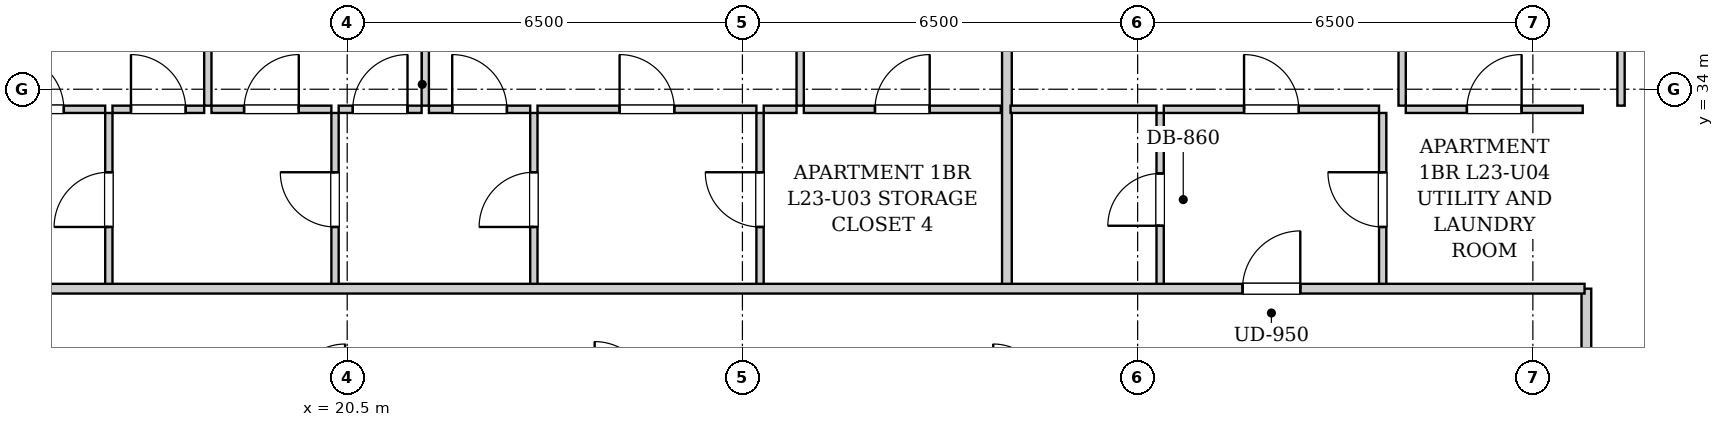
"""IFC4 building model, lengths in metres.
Left out: names, types, materials, properties, quantities, classifications, styles, units other than length and angle.
Written with IfcOpenShell. Run it as: python <this file> out.ifc"""

import sys

from ifc_helpers import new_model, si_unit, direction, frame, frame_2d, origin, place, context, subcontext, project, spatial, rectangle, extrude, element, fill, save


model = new_model("IFC4")
c1 = context("Model", 3, precision=1e-05, world=origin(), true_north=direction((0.0, 1.0)))
c2 = subcontext(c1, "Body", "Model", "MODEL_VIEW")
j1 = project(units=[si_unit("LENGTHUNIT", "METRE"), si_unit("PLANEANGLEUNIT", "RADIAN")], contexts=[c1])
p1 = place(None, origin())
s1 = spatial("IfcSite", under=j1, at=p1, CompositionType="ELEMENT")
p2 = place(p1, origin())
s2 = spatial("IfcBuilding", under=s1, at=p2, CompositionType="ELEMENT")
p3 = place(p2, frame((0.0, 0.0, 84.7)))
s3 = spatial("IfcBuildingStorey", under=s2, at=p3, CompositionType="ELEMENT", Elevation=84.7)
p4 = place(p3, frame((40.88, 28.98, 0.0), z_axis=(0.0, 0.0, 1.0), x_axis=(0.0, 1.0, 0.0)))
e1 = element("IfcWall", 1, at=p4, inside=s3, PredefinedType="PARTITIONING", context=c2, shape_type="SweptSolid", body=[
    extrude(rectangle(XDim=1.74, YDim=0.16, at=frame_2d((0.87, 0.0))), origin(), (0.0, 0.0, 1.0), 2.94),
])
p5 = place(p3, frame((16.58, 30.76, 0.0), z_axis=(0.0, 0.0, 1.0), x_axis=(0.0, 1.0, 0.0)))
e2 = element("IfcWall", 2, at=p5, inside=s3, PredefinedType="PARTITIONING", context=c2, shape_type="SweptSolid", body=[
    extrude(rectangle(XDim=2.85, YDim=0.12, at=frame_2d((1.425, 0.0))), origin(), (0.0, 0.0, 1.0), 2.94),
])
p6 = place(p5, frame((0.975, 0.0, 0.0)))
e3 = element("IfcOpeningElement", 3, at=p6, cuts=e2, PredefinedType="OPENING", context=c2, shape_type="SweptSolid", body=[
    extrude(rectangle(XDim=0.9, YDim=2.05, at=frame_2d((0.45, 1.025))), frame((0.0, 0.07, 0.0), z_axis=(0.0, -1.0, 0.0), x_axis=(1.0, 0.0, 0.0)), (0.0, 0.0, 1.0), 0.14),
])
p7 = place(p3, frame((14.26, 33.67, 0.0), z_axis=(0.0, 0.0, 1.0), x_axis=(1.0, 0.0, 0.0)))
e4 = element("IfcWall", 4, at=p7, inside=s3, PredefinedType="PARTITIONING", context=c2, shape_type="SweptSolid", body=[
    extrude(rectangle(XDim=2.26, YDim=0.12, at=frame_2d((1.13, 0.0))), origin(), (0.0, 0.0, 1.0), 2.94),
])
p8 = place(p7, frame((0.68, 0.0, 0.0)))
e5 = element("IfcOpeningElement", 5, at=p8, cuts=e4, PredefinedType="OPENING", context=c2, shape_type="SweptSolid", body=[
    extrude(rectangle(XDim=0.9, YDim=2.05, at=frame_2d((0.45, 1.025))), frame((0.0, 0.07, 0.0), z_axis=(0.0, -1.0, 0.0), x_axis=(1.0, 0.0, 0.0)), (0.0, 0.0, 1.0), 0.14),
])
p9 = place(p3, frame((20.3, 30.76, 0.0), z_axis=(0.0, 0.0, 1.0), x_axis=(0.0, 1.0, 0.0)))
e6 = element("IfcWall", 6, at=p9, inside=s3, PredefinedType="PARTITIONING", context=c2, shape_type="SweptSolid", body=[
    extrude(rectangle(XDim=2.85, YDim=0.12, at=frame_2d((1.425, 0.0))), origin(), (0.0, 0.0, 1.0), 2.94),
])
p10 = place(p9, frame((0.975, 0.0, 0.0)))
e7 = element("IfcOpeningElement", 7, at=p10, cuts=e6, PredefinedType="OPENING", context=c2, shape_type="SweptSolid", body=[
    extrude(rectangle(XDim=0.9, YDim=2.05, at=frame_2d((0.45, 1.025))), frame((0.0, 0.07, 0.0), z_axis=(0.0, -1.0, 0.0), x_axis=(1.0, 0.0, 0.0)), (0.0, 0.0, 1.0), 0.14),
])
p11 = place(p3, frame((16.64, 33.67, 0.0), z_axis=(0.0, 0.0, 1.0), x_axis=(1.0, 0.0, 0.0)))
e8 = element("IfcWall", 8, at=p11, inside=s3, PredefinedType="PARTITIONING", context=c2, shape_type="SweptSolid", body=[
    extrude(rectangle(XDim=1.508, YDim=0.12, at=frame_2d((0.754, 0.0))), origin(), (0.0, 0.0, 1.0), 2.94),
])
p12 = place(p11, frame((0.304, 0.0, 0.0)))
e9 = element("IfcOpeningElement", 9, at=p12, cuts=e8, PredefinedType="OPENING", context=c2, shape_type="SweptSolid", body=[
    extrude(rectangle(XDim=0.9, YDim=2.05, at=frame_2d((0.45, 1.025))), frame((0.0, 0.07, 0.0), z_axis=(0.0, -1.0, 0.0), x_axis=(1.0, 0.0, 0.0)), (0.0, 0.0, 1.0), 0.14),
])
p13 = place(p3, frame((18.268, 33.67, 0.0), z_axis=(0.0, 0.0, 1.0), x_axis=(1.0, 0.0, 0.0)))
e10 = element("IfcWall", 10, at=p13, inside=s3, PredefinedType="PARTITIONING", context=c2, shape_type="SweptSolid", body=[
    extrude(rectangle(XDim=1.972, YDim=0.12, at=frame_2d((0.986, 0.0))), origin(), (0.0, 0.0, 1.0), 2.94),
])
p14 = place(p13, frame((0.536, 0.0, 0.0)))
e11 = element("IfcOpeningElement", 11, at=p14, cuts=e10, PredefinedType="OPENING", context=c2, shape_type="SweptSolid", body=[
    extrude(rectangle(XDim=0.9, YDim=2.05, at=frame_2d((0.45, 1.025))), frame((0.0, 0.07, 0.0), z_axis=(0.0, -1.0, 0.0), x_axis=(1.0, 0.0, 0.0)), (0.0, 0.0, 1.0), 0.14),
])
p15 = place(p3, frame((23.57, 30.76, 0.0), z_axis=(0.0, 0.0, 1.0), x_axis=(0.0, 1.0, 0.0)))
e12 = element("IfcWall", 12, at=p15, inside=s3, PredefinedType="PARTITIONING", context=c2, shape_type="SweptSolid", body=[
    extrude(rectangle(XDim=2.85, YDim=0.12, at=frame_2d((1.425, 0.0))), origin(), (0.0, 0.0, 1.0), 2.94),
])
p16 = place(p15, frame((0.975, 0.0, 0.0)))
e13 = element("IfcOpeningElement", 13, at=p16, cuts=e12, PredefinedType="OPENING", context=c2, shape_type="SweptSolid", body=[
    extrude(rectangle(XDim=0.9, YDim=2.05, at=frame_2d((0.45, 1.025))), frame((0.0, 0.07, 0.0), z_axis=(0.0, -1.0, 0.0), x_axis=(1.0, 0.0, 0.0)), (0.0, 0.0, 1.0), 0.14),
])
p17 = place(p3, frame((20.36, 33.67, 0.0), z_axis=(0.0, 0.0, 1.0), x_axis=(1.0, 0.0, 0.0)))
e14 = element("IfcWall", 14, at=p17, inside=s3, PredefinedType="PARTITIONING", context=c2, shape_type="SweptSolid", body=[
    extrude(rectangle(XDim=1.364, YDim=0.12, at=frame_2d((0.682, 0.0))), origin(), (0.0, 0.0, 1.0), 2.94),
])
p18 = place(p17, frame((0.232, 0.0, 0.0)))
e15 = element("IfcOpeningElement", 15, at=p18, cuts=e14, PredefinedType="OPENING", context=c2, shape_type="SweptSolid", body=[
    extrude(rectangle(XDim=0.9, YDim=2.05, at=frame_2d((0.45, 1.025))), frame((0.0, 0.07, 0.0), z_axis=(0.0, -1.0, 0.0), x_axis=(1.0, 0.0, 0.0)), (0.0, 0.0, 1.0), 0.14),
])
p19 = place(p3, frame((21.844, 33.67, 0.0), z_axis=(0.0, 0.0, 1.0), x_axis=(1.0, 0.0, 0.0)))
e16 = element("IfcWall", 16, at=p19, inside=s3, PredefinedType="PARTITIONING", context=c2, shape_type="SweptSolid", body=[
    extrude(rectangle(XDim=1.666, YDim=0.12, at=frame_2d((0.833, 0.0))), origin(), (0.0, 0.0, 1.0), 2.94),
])
p20 = place(p19, frame((0.383, 0.0, 0.0)))
e17 = element("IfcOpeningElement", 17, at=p20, cuts=e16, PredefinedType="OPENING", context=c2, shape_type="SweptSolid", body=[
    extrude(rectangle(XDim=0.9, YDim=2.05, at=frame_2d((0.45, 1.025))), frame((0.0, 0.07, 0.0), z_axis=(0.0, -1.0, 0.0), x_axis=(1.0, 0.0, 0.0)), (0.0, 0.0, 1.0), 0.14),
])
p21 = place(p3, frame((27.29, 30.76, 0.0), z_axis=(0.0, 0.0, 1.0), x_axis=(0.0, 1.0, 0.0)))
e18 = element("IfcWall", 18, at=p21, inside=s3, PredefinedType="PARTITIONING", context=c2, shape_type="SweptSolid", body=[
    extrude(rectangle(XDim=2.85, YDim=0.12, at=frame_2d((1.425, 0.0))), origin(), (0.0, 0.0, 1.0), 2.94),
])
p22 = place(p21, frame((0.975, 0.0, 0.0)))
e19 = element("IfcOpeningElement", 19, at=p22, cuts=e18, PredefinedType="OPENING", context=c2, shape_type="SweptSolid", body=[
    extrude(rectangle(XDim=0.9, YDim=2.05, at=frame_2d((0.45, 1.025))), frame((0.0, 0.07, 0.0), z_axis=(0.0, -1.0, 0.0), x_axis=(1.0, 0.0, 0.0)), (0.0, 0.0, 1.0), 0.14),
])
p23 = place(p3, frame((23.63, 33.67, 0.0), z_axis=(0.0, 0.0, 1.0), x_axis=(1.0, 0.0, 0.0)))
e20 = element("IfcWall", 20, at=p23, inside=s3, PredefinedType="PARTITIONING", context=c2, shape_type="SweptSolid", body=[
    extrude(rectangle(XDim=3.6, YDim=0.12, at=frame_2d((1.8, 0.0))), origin(), (0.0, 0.0, 1.0), 2.94),
])
p24 = place(p23, frame((1.35, 0.0, 0.0)))
e21 = element("IfcOpeningElement", 21, at=p24, cuts=e20, PredefinedType="OPENING", context=c2, shape_type="SweptSolid", body=[
    extrude(rectangle(XDim=0.9, YDim=2.05, at=frame_2d((0.45, 1.025))), frame((0.0, 0.07, 0.0), z_axis=(0.0, -1.0, 0.0), x_axis=(1.0, 0.0, 0.0)), (0.0, 0.0, 1.0), 0.14),
])
p25 = place(p3, frame((27.35, 33.67, 0.0), z_axis=(0.0, 0.0, 1.0), x_axis=(1.0, 0.0, 0.0)))
e22 = element("IfcWall", 22, at=p25, inside=s3, PredefinedType="PARTITIONING", context=c2, shape_type="SweptSolid", body=[
    extrude(rectangle(XDim=0.54, YDim=0.12, at=frame_2d((0.27, 0.0))), origin(), (0.0, 0.0, 1.0), 2.94),
])
p26 = place(p3, frame((28.01, 33.67, 0.0), z_axis=(0.0, 0.0, 1.0), x_axis=(1.0, 0.0, 0.0)))
e23 = element("IfcWall", 23, at=p26, inside=s3, PredefinedType="PARTITIONING", context=c2, shape_type="SweptSolid", body=[
    extrude(rectangle(XDim=3.24, YDim=0.12, at=frame_2d((1.62, 0.0))), origin(), (0.0, 0.0, 1.0), 2.94),
])
p27 = place(p26, frame((1.17, 0.0, 0.0)))
e24 = element("IfcOpeningElement", 24, at=p27, cuts=e23, PredefinedType="OPENING", context=c2, shape_type="SweptSolid", body=[
    extrude(rectangle(XDim=0.9, YDim=2.05, at=frame_2d((0.45, 1.025))), frame((0.0, 0.07, 0.0), z_axis=(0.0, -1.0, 0.0), x_axis=(1.0, 0.0, 0.0)), (0.0, 0.0, 1.0), 0.14),
])
p28 = place(p3, frame((18.208, 33.73, 0.0), z_axis=(0.0, 0.0, 1.0), x_axis=(0.0, 1.0, 0.0)))
e25 = element("IfcWall", 25, at=p28, inside=s3, PredefinedType="PARTITIONING", context=c2, shape_type="SweptSolid", body=[
    extrude(rectangle(XDim=9.29, YDim=0.12, at=frame_2d((4.645, 0.0))), origin(), (0.0, 0.0, 1.0), 2.94),
])
p29 = place(p28, frame((4.18, 0.0, 0.0)))
e26 = element("IfcOpeningElement", 26, at=p29, cuts=e25, PredefinedType="OPENING", context=c2, shape_type="SweptSolid", body=[
    extrude(rectangle(XDim=0.9, YDim=2.05, at=frame_2d((0.45, 1.025))), frame((0.0, 0.07, 0.0), z_axis=(0.0, -1.0, 0.0), x_axis=(1.0, 0.0, 0.0)), (0.0, 0.0, 1.0), 0.14),
])
p30 = place(p3, frame((21.784, 33.73, 0.0), z_axis=(0.0, 0.0, 1.0), x_axis=(0.0, 1.0, 0.0)))
e27 = element("IfcWall", 27, at=p30, inside=s3, PredefinedType="PARTITIONING", context=c2, shape_type="SweptSolid", body=[
    extrude(rectangle(XDim=9.29, YDim=0.12, at=frame_2d((4.645, 0.0))), origin(), (0.0, 0.0, 1.0), 2.94),
])
p31 = place(p30, frame((4.18, 0.0, 0.0)))
e28 = element("IfcOpeningElement", 28, at=p31, cuts=e27, PredefinedType="OPENING", context=c2, shape_type="SweptSolid", body=[
    extrude(rectangle(XDim=0.9, YDim=2.05, at=frame_2d((0.45, 1.025))), frame((0.0, 0.07, 0.0), z_axis=(0.0, -1.0, 0.0), x_axis=(1.0, 0.0, 0.0)), (0.0, 0.0, 1.0), 0.14),
])
p32 = place(p3, frame((27.95, 33.73, 0.0), z_axis=(0.0, 0.0, 1.0), x_axis=(0.0, 1.0, 0.0)))
e29 = element("IfcWall", 29, at=p32, inside=s3, PredefinedType="PARTITIONING", context=c2, shape_type="SweptSolid", body=[
    extrude(rectangle(XDim=9.29, YDim=0.12, at=frame_2d((4.645, 0.0))), origin(), (0.0, 0.0, 1.0), 2.94),
])
p33 = place(p32, frame((4.18, 0.0, 0.0)))
e30 = element("IfcOpeningElement", 30, at=p33, cuts=e29, PredefinedType="OPENING", context=c2, shape_type="SweptSolid", body=[
    extrude(rectangle(XDim=0.9, YDim=2.05, at=frame_2d((0.45, 1.025))), frame((0.0, 0.07, 0.0), z_axis=(0.0, -1.0, 0.0), x_axis=(1.0, 0.0, 0.0)), (0.0, 0.0, 1.0), 0.14),
])
p34 = place(p3, frame((31.35, 30.76, 0.0), z_axis=(0.0, 0.0, 1.0), x_axis=(0.0, 1.0, 0.0)))
e31 = element("IfcWall", 31, at=p34, inside=s3, PredefinedType="PARTITIONING", context=c2, shape_type="SweptSolid", body=[
    extrude(rectangle(XDim=12.26, YDim=0.16, at=frame_2d((6.13, 0.0))), origin(), (0.0, 0.0, 1.0), 2.94),
])
p35 = place(p3, frame((33.87, 30.76, 0.0), z_axis=(0.0, 0.0, 1.0), x_axis=(0.0, 1.0, 0.0)))
e32 = element("IfcWall", 32, at=p35, inside=s3, PredefinedType="PARTITIONING", context=c2, shape_type="SweptSolid", body=[
    extrude(rectangle(XDim=2.85, YDim=0.12, at=frame_2d((1.425, 0.0))), origin(), (0.0, 0.0, 1.0), 2.94),
])
p36 = place(p35, frame((0.995, 0.0, 0.0)))
e33 = element("IfcOpeningElement", 33, at=p36, cuts=e32, PredefinedType="OPENING", context=c2, shape_type="SweptSolid", body=[
    extrude(rectangle(XDim=0.86, YDim=2.05, at=frame_2d((0.43, 1.025))), frame((0.0, 0.07, 0.0), z_axis=(0.0, -1.0, 0.0), x_axis=(1.0, 0.0, 0.0)), (0.0, 0.0, 1.0), 0.14),
])
p37 = place(p3, frame((31.41, 33.67, 0.0), z_axis=(0.0, 0.0, 1.0), x_axis=(1.0, 0.0, 0.0)))
e34 = element("IfcWall", 34, at=p37, inside=s3, PredefinedType="PARTITIONING", context=c2, shape_type="SweptSolid", body=[
    extrude(rectangle(XDim=2.4, YDim=0.12, at=frame_2d((1.2, 0.0))), origin(), (0.0, 0.0, 1.0), 2.94),
])
p38 = place(p3, frame((37.53, 30.76, 0.0), z_axis=(0.0, 0.0, 1.0), x_axis=(0.0, 1.0, 0.0)))
e35 = element("IfcWall", 35, at=p38, inside=s3, PredefinedType="PARTITIONING", context=c2, shape_type="SweptSolid", body=[
    extrude(rectangle(XDim=2.85, YDim=0.12, at=frame_2d((1.425, 0.0))), origin(), (0.0, 0.0, 1.0), 2.94),
])
p39 = place(p38, frame((0.975, 0.0, 0.0)))
e36 = element("IfcOpeningElement", 36, at=p39, cuts=e35, PredefinedType="OPENING", context=c2, shape_type="SweptSolid", body=[
    extrude(rectangle(XDim=0.9, YDim=2.05, at=frame_2d((0.45, 1.025))), frame((0.0, 0.07, 0.0), z_axis=(0.0, -1.0, 0.0), x_axis=(1.0, 0.0, 0.0)), (0.0, 0.0, 1.0), 0.14),
])
p40 = place(p3, frame((33.93, 33.67, 0.0), z_axis=(0.0, 0.0, 1.0), x_axis=(1.0, 0.0, 0.0)))
e37 = element("IfcWall", 37, at=p40, inside=s3, PredefinedType="PARTITIONING", context=c2, shape_type="SweptSolid", body=[
    extrude(rectangle(XDim=3.54, YDim=0.12, at=frame_2d((1.77, 0.0))), origin(), (0.0, 0.0, 1.0), 2.94),
])
p41 = place(p40, frame((1.32, 0.0, 0.0)))
e38 = element("IfcOpeningElement", 38, at=p41, cuts=e37, PredefinedType="OPENING", context=c2, shape_type="SweptSolid", body=[
    extrude(rectangle(XDim=0.9, YDim=2.05, at=frame_2d((0.45, 1.025))), frame((0.0, 0.07, 0.0), z_axis=(0.0, -1.0, 0.0), x_axis=(1.0, 0.0, 0.0)), (0.0, 0.0, 1.0), 0.14),
])
p42 = place(p3, frame((37.91, 33.67, 0.0), z_axis=(0.0, 0.0, 1.0), x_axis=(1.0, 0.0, 0.0)))
e39 = element("IfcWall", 39, at=p42, inside=s3, PredefinedType="PARTITIONING", context=c2, shape_type="SweptSolid", body=[
    extrude(rectangle(XDim=2.91, YDim=0.12, at=frame_2d((1.455, 0.0))), origin(), (0.0, 0.0, 1.0), 2.94),
])
p43 = place(p42, frame((1.005, 0.0, 0.0)))
e40 = element("IfcOpeningElement", 40, at=p43, cuts=e39, PredefinedType="OPENING", context=c2, shape_type="SweptSolid", body=[
    extrude(rectangle(XDim=0.9, YDim=2.05, at=frame_2d((0.45, 1.025))), frame((0.0, 0.07, 0.0), z_axis=(0.0, -1.0, 0.0), x_axis=(1.0, 0.0, 0.0)), (0.0, 0.0, 1.0), 0.14),
])
p44 = place(p3, frame((37.85, 33.73, 0.0), z_axis=(0.0, 0.0, 1.0), x_axis=(0.0, 1.0, 0.0)))
e41 = element("IfcWall", 41, at=p44, inside=s3, PredefinedType="PARTITIONING", context=c2, shape_type="SweptSolid", body=[
    extrude(rectangle(XDim=7.14, YDim=0.12, at=frame_2d((3.57, 0.0))), origin(), (0.0, 0.0, 1.0), 2.94),
])
p45 = place(p44, frame((3.12, 0.0, 0.0)))
e42 = element("IfcOpeningElement", 42, at=p45, cuts=e41, PredefinedType="OPENING", context=c2, shape_type="SweptSolid", body=[
    extrude(rectangle(XDim=0.9, YDim=2.05, at=frame_2d((0.45, 1.025))), frame((0.0, 0.07, 0.0), z_axis=(0.0, -1.0, 0.0), x_axis=(1.0, 0.0, 0.0)), (0.0, 0.0, 1.0), 0.14),
])
p46 = place(p3, frame((41.45, 33.73, 0.0), z_axis=(0.0, 0.0, 1.0), x_axis=(0.0, 1.0, 0.0)))
e43 = element("IfcWall", 43, at=p46, inside=s3, PredefinedType="PARTITIONING", context=c2, shape_type="SweptSolid", body=[
    extrude(rectangle(XDim=7.14, YDim=0.12, at=frame_2d((3.57, 0.0))), origin(), (0.0, 0.0, 1.0), 2.94),
])
p47 = place(p46, frame((3.075, 0.0, 0.0)))
e44 = element("IfcOpeningElement", 44, at=p47, cuts=e43, PredefinedType="OPENING", context=c2, shape_type="SweptSolid", body=[
    extrude(rectangle(XDim=0.9, YDim=2.05, at=frame_2d((0.45, 1.025))), frame((0.0, 0.07, 0.0), z_axis=(0.0, -1.0, 0.0), x_axis=(1.0, 0.0, 0.0)), (0.0, 0.0, 1.0), 0.14),
])
p48 = place(p3, frame((10.05, 30.72, 0.0), z_axis=(0.0, 0.0, 1.0), x_axis=(1.0, 0.0, 0.0)))
e45 = element("IfcWall", 45, at=p48, inside=s3, PredefinedType="PARTITIONING", context=c2, shape_type="SweptSolid", body=[
    extrude(rectangle(XDim=30.8, YDim=0.16, at=frame_2d((15.4, 0.0))), origin(), (0.0, 0.0, 1.0), 2.94),
])
p49 = place(p48, frame((4.035, 0.0, 0.0)))
e46 = element("IfcOpeningElement", 46, at=p49, cuts=e45, PredefinedType="OPENING", context=c2, shape_type="SweptSolid", body=[
    extrude(rectangle(XDim=0.95, YDim=2.1, at=frame_2d((0.475, 1.05))), frame((0.0, 0.09, 0.0), z_axis=(0.0, -1.0, 0.0), x_axis=(1.0, 0.0, 0.0)), (0.0, 0.0, 1.0), 0.18),
])
p50 = place(p48, frame((25.175, 0.0, 0.0)))
e47 = element("IfcOpeningElement", 47, at=p50, cuts=e45, PredefinedType="OPENING", context=c2, shape_type="SweptSolid", body=[
    extrude(rectangle(XDim=0.95, YDim=2.1, at=frame_2d((0.475, 1.05))), frame((0.0, 0.09, 0.0), z_axis=(0.0, -1.0, 0.0), x_axis=(1.0, 0.0, 0.0)), (0.0, 0.0, 1.0), 0.18),
])
p51 = place(p6, origin())
e48 = element("IfcDoor", 48, at=p51, inside=s3, OperationType="SINGLE_SWING_LEFT", PredefinedType="DOOR", context=c2, shape_type="SweptSolid", body=[
    extrude(rectangle(XDim=0.9, YDim=2.05, at=frame_2d((0.45, 1.025))), frame((0.0, 0.025, 0.0), z_axis=(0.0, -1.0, 0.0), x_axis=(1.0, 0.0, 0.0)), (0.0, 0.0, 1.0), 0.05),
])
fill(e3, e48)
p52 = place(p8, origin())
e49 = element("IfcDoor", 49, at=p52, inside=s3, OperationType="SINGLE_SWING_LEFT", PredefinedType="DOOR", context=c2, shape_type="SweptSolid", body=[
    extrude(rectangle(XDim=0.9, YDim=2.05, at=frame_2d((0.45, 1.025))), frame((0.0, 0.025, 0.0), z_axis=(0.0, -1.0, 0.0), x_axis=(1.0, 0.0, 0.0)), (0.0, 0.0, 1.0), 0.05),
])
fill(e5, e49)
p53 = place(p10, origin())
e50 = element("IfcDoor", 50, at=p53, inside=s3, OperationType="SINGLE_SWING_RIGHT", PredefinedType="DOOR", context=c2, shape_type="SweptSolid", body=[
    extrude(rectangle(XDim=0.9, YDim=2.05, at=frame_2d((0.45, 1.025))), frame((0.0, 0.025, 0.0), z_axis=(0.0, -1.0, 0.0), x_axis=(1.0, 0.0, 0.0)), (0.0, 0.0, 1.0), 0.05),
])
fill(e7, e50)
p54 = place(p12, origin())
e51 = element("IfcDoor", 51, at=p54, inside=s3, OperationType="SINGLE_SWING_LEFT", PredefinedType="DOOR", context=c2, shape_type="SweptSolid", body=[
    extrude(rectangle(XDim=0.9, YDim=2.05, at=frame_2d((0.45, 1.025))), frame((0.0, 0.025, 0.0), z_axis=(0.0, -1.0, 0.0), x_axis=(1.0, 0.0, 0.0)), (0.0, 0.0, 1.0), 0.05),
])
fill(e9, e51)
p55 = place(p14, origin())
e52 = element("IfcDoor", 52, at=p55, inside=s3, OperationType="SINGLE_SWING_RIGHT", PredefinedType="DOOR", context=c2, shape_type="SweptSolid", body=[
    extrude(rectangle(XDim=0.9, YDim=2.05, at=frame_2d((0.45, 1.025))), frame((0.0, 0.025, 0.0), z_axis=(0.0, -1.0, 0.0), x_axis=(1.0, 0.0, 0.0)), (0.0, 0.0, 1.0), 0.05),
])
fill(e11, e52)
p56 = place(p16, origin())
e53 = element("IfcDoor", 53, at=p56, inside=s3, OperationType="SINGLE_SWING_LEFT", PredefinedType="DOOR", context=c2, shape_type="SweptSolid", body=[
    extrude(rectangle(XDim=0.9, YDim=2.05, at=frame_2d((0.45, 1.025))), frame((0.0, 0.025, 0.0), z_axis=(0.0, -1.0, 0.0), x_axis=(1.0, 0.0, 0.0)), (0.0, 0.0, 1.0), 0.05),
])
fill(e13, e53)
p57 = place(p18, origin())
e54 = element("IfcDoor", 54, at=p57, inside=s3, OperationType="SINGLE_SWING_RIGHT", PredefinedType="DOOR", context=c2, shape_type="SweptSolid", body=[
    extrude(rectangle(XDim=0.9, YDim=2.05, at=frame_2d((0.45, 1.025))), frame((0.0, 0.025, 0.0), z_axis=(0.0, -1.0, 0.0), x_axis=(1.0, 0.0, 0.0)), (0.0, 0.0, 1.0), 0.05),
])
fill(e15, e54)
p58 = place(p20, origin())
e55 = element("IfcDoor", 55, at=p58, inside=s3, OperationType="SINGLE_SWING_LEFT", PredefinedType="DOOR", context=c2, shape_type="SweptSolid", body=[
    extrude(rectangle(XDim=0.9, YDim=2.05, at=frame_2d((0.45, 1.025))), frame((0.0, 0.025, 0.0), z_axis=(0.0, -1.0, 0.0), x_axis=(1.0, 0.0, 0.0)), (0.0, 0.0, 1.0), 0.05),
])
fill(e17, e55)
p59 = place(p22, origin())
e56 = element("IfcDoor", 56, at=p59, inside=s3, OperationType="SINGLE_SWING_RIGHT", PredefinedType="DOOR", context=c2, shape_type="SweptSolid", body=[
    extrude(rectangle(XDim=0.9, YDim=2.05, at=frame_2d((0.45, 1.025))), frame((0.0, 0.025, 0.0), z_axis=(0.0, -1.0, 0.0), x_axis=(1.0, 0.0, 0.0)), (0.0, 0.0, 1.0), 0.05),
])
fill(e19, e56)
p60 = place(p24, origin())
e57 = element("IfcDoor", 57, at=p60, inside=s3, OperationType="SINGLE_SWING_LEFT", PredefinedType="DOOR", context=c2, shape_type="SweptSolid", body=[
    extrude(rectangle(XDim=0.9, YDim=2.05, at=frame_2d((0.45, 1.025))), frame((0.0, 0.025, 0.0), z_axis=(0.0, -1.0, 0.0), x_axis=(1.0, 0.0, 0.0)), (0.0, 0.0, 1.0), 0.05),
])
fill(e21, e57)
p61 = place(p27, origin())
e58 = element("IfcDoor", 58, at=p61, inside=s3, OperationType="SINGLE_SWING_RIGHT", PredefinedType="DOOR", context=c2, shape_type="SweptSolid", body=[
    extrude(rectangle(XDim=0.9, YDim=2.05, at=frame_2d((0.45, 1.025))), frame((0.0, 0.025, 0.0), z_axis=(0.0, -1.0, 0.0), x_axis=(1.0, 0.0, 0.0)), (0.0, 0.0, 1.0), 0.05),
])
fill(e24, e58)
p62 = place(p36, origin())
e59 = element("IfcDoor", 59, at=p62, inside=s3, OperationType="SINGLE_SWING_LEFT", PredefinedType="DOOR", context=c2, shape_type="SweptSolid", body=[
    extrude(rectangle(XDim=0.86, YDim=2.05, at=frame_2d((0.43, 1.025))), frame((0.0, 0.025, 0.0), z_axis=(0.0, -1.0, 0.0), x_axis=(1.0, 0.0, 0.0)), (0.0, 0.0, 1.0), 0.05),
])
fill(e33, e59)
p63 = place(p39, origin())
e60 = element("IfcDoor", 60, at=p63, inside=s3, OperationType="SINGLE_SWING_RIGHT", PredefinedType="DOOR", context=c2, shape_type="SweptSolid", body=[
    extrude(rectangle(XDim=0.9, YDim=2.05, at=frame_2d((0.45, 1.025))), frame((0.0, 0.025, 0.0), z_axis=(0.0, -1.0, 0.0), x_axis=(1.0, 0.0, 0.0)), (0.0, 0.0, 1.0), 0.05),
])
fill(e36, e60)
p64 = place(p41, origin())
e61 = element("IfcDoor", 61, at=p64, inside=s3, OperationType="SINGLE_SWING_LEFT", PredefinedType="DOOR", context=c2, shape_type="SweptSolid", body=[
    extrude(rectangle(XDim=0.9, YDim=2.05, at=frame_2d((0.45, 1.025))), frame((0.0, 0.025, 0.0), z_axis=(0.0, -1.0, 0.0), x_axis=(1.0, 0.0, 0.0)), (0.0, 0.0, 1.0), 0.05),
])
fill(e38, e61)
p65 = place(p43, origin())
e62 = element("IfcDoor", 62, at=p65, inside=s3, OperationType="SINGLE_SWING_RIGHT", PredefinedType="DOOR", context=c2, shape_type="SweptSolid", body=[
    extrude(rectangle(XDim=0.9, YDim=2.05, at=frame_2d((0.45, 1.025))), frame((0.0, 0.025, 0.0), z_axis=(0.0, -1.0, 0.0), x_axis=(1.0, 0.0, 0.0)), (0.0, 0.0, 1.0), 0.05),
])
fill(e40, e62)
p66 = place(p50, origin())
e63 = element("IfcDoor", 63, at=p66, inside=s3, OperationType="SINGLE_SWING_RIGHT", PredefinedType="DOOR", context=c2, shape_type="SweptSolid", body=[
    extrude(rectangle(XDim=0.95, YDim=2.1, at=frame_2d((0.475, 1.05))), frame((0.0, 0.025, 0.0), z_axis=(0.0, -1.0, 0.0), x_axis=(1.0, 0.0, 0.0)), (0.0, 0.0, 1.0), 0.05),
])
fill(e47, e63)
save(model, sys.argv[1])
